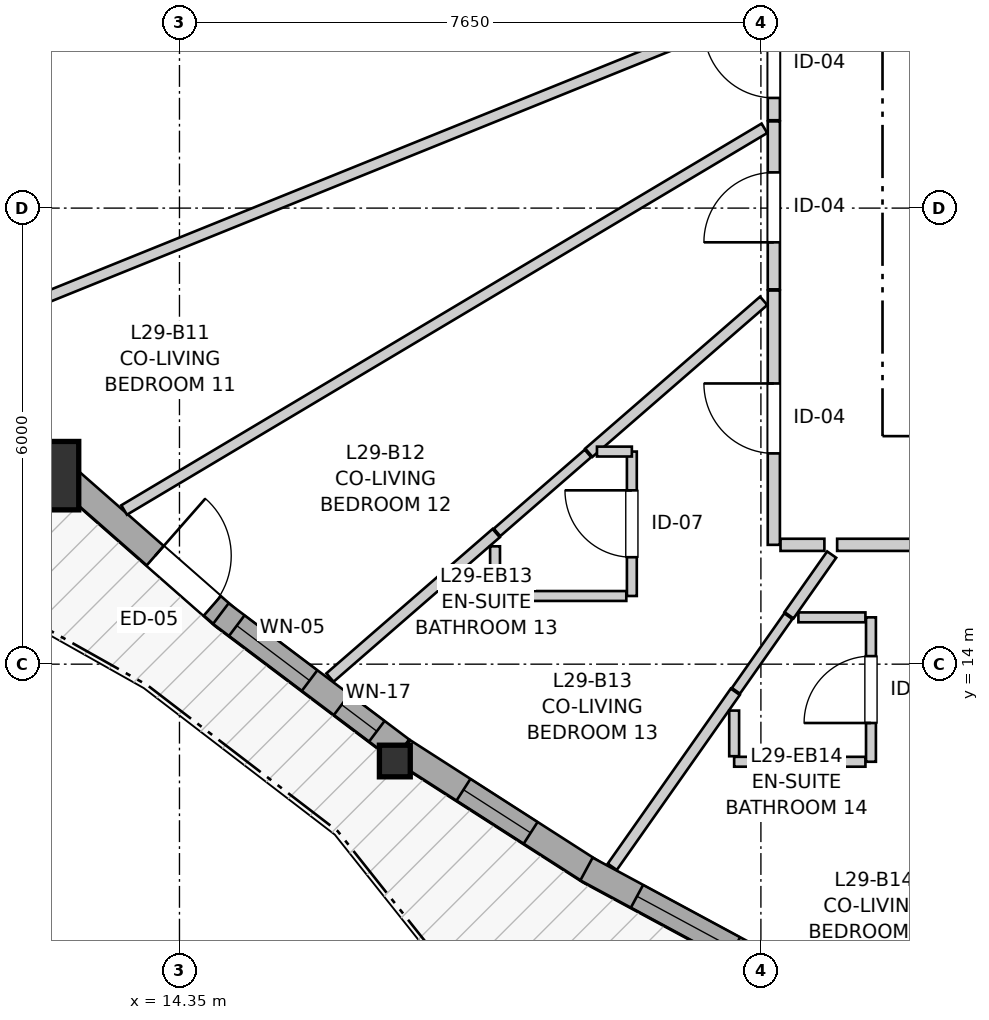
"""IFC4 building model, lengths in metres.
Left out: names, types, materials, properties, quantities, classifications, styles, units other than length and angle.
Written with IfcOpenShell. Run it as: python <this file> out.ifc"""

import sys

from ifc_helpers import new_model, si_unit, direction, frame, frame_2d, origin, origin_2d, place, context, subcontext, project, spatial, rectangle, i_section, extrude, source, transform, mapped, element, fill, save


model = new_model("IFC4")
c1 = context("Model", 3, precision=1e-05, world=origin(), true_north=direction((0.0, 1.0)))
c2 = subcontext(c1, "Body", "Model", "MODEL_VIEW")
j1 = project(units=[si_unit("LENGTHUNIT", "METRE"), si_unit("PLANEANGLEUNIT", "RADIAN")], contexts=[c1])
p1 = place(None, origin())
s1 = spatial("IfcSite", under=j1, at=p1, CompositionType="ELEMENT")
p2 = place(p1, origin())
s2 = spatial("IfcBuilding", under=s1, at=p2, CompositionType="ELEMENT")
p3 = place(p2, frame((0.0, 0.0, 99.2)))
s3 = spatial("IfcBuildingStorey", under=s2, at=p3, CompositionType="ELEMENT", Elevation=99.2)
m1 = source(origin(), c2, "Body", "SweptSolid", [
    extrude(rectangle(XDim=0.9, YDim=0.9, at=origin_2d()), origin(), (0.0, 0.0, 1.0), 2.95),
])
p4 = place(p3, frame((12.575, 16.48, 0.0), z_axis=(0.0, 0.0, 1.0), x_axis=(1.0, 0.0, 0.0)))
e1 = element("IfcColumn", 1, at=p4, inside=s3, PredefinedType="COLUMN", context=c2, shape_type="MappedRepresentation", body=[
    mapped(m1, transform((0.0, 0.0, 0.0), x_axis=(1.0, 0.0, 0.0), y_axis=(0.0, 1.0, 0.0), z_axis=(0.0, 0.0, 1.0), scale=1.0)),
])
m2 = source(origin(), c2, "Body", "SweptSolid", [
    extrude(i_section(OverallWidth=0.406, OverallDepth=0.416, WebThickness=0.027, FlangeThickness=0.044, FilletRadius=0.015, at=origin_2d()), origin(), (0.0, 0.0, 1.0), 2.95),
])
p5 = place(p3, frame((17.184, 12.726, 0.0), z_axis=(0.0, 0.0, 1.0), x_axis=(1.0, 0.0, 0.0)))
e2 = element("IfcColumn", 2, at=p5, inside=s3, PredefinedType="PILASTER", context=c2, shape_type="MappedRepresentation", body=[
    mapped(m2, transform((0.0, 0.0, 0.0), x_axis=(1.0, 0.0, 0.0), y_axis=(0.0, 1.0, 0.0), z_axis=(0.0, 0.0, 1.0), scale=1.0)),
])
p6 = place(p3, frame((12.86, 16.456, 0.0), z_axis=(0.0, 0.0, 1.0), x_axis=(0.751500349331, -0.659732692047, 0.0)))
e3 = element("IfcWall", 3, at=p6, inside=s3, PredefinedType="SOLIDWALL", context=c2, shape_type="SweptSolid", body=[
    extrude(rectangle(XDim=2.799, YDim=0.34, at=frame_2d((1.399, 0.0))), origin(), (0.0, 0.0, 1.0), 2.48),
])
p7 = place(p6, frame((1.559, 0.0, 0.0)))
e4 = element("IfcOpeningElement", 4, at=p7, cuts=e3, PredefinedType="OPENING", context=c2, shape_type="SweptSolid", body=[
    extrude(rectangle(XDim=1.0, YDim=2.1, at=frame_2d((0.5, 1.05))), frame((0.0, 0.18, 0.0), z_axis=(0.0, -1.0, 0.0), x_axis=(1.0, 0.0, 0.0)), (0.0, 0.0, 1.0), 0.36),
])
p8 = place(p3, frame((14.894, 14.665, 0.0), z_axis=(0.0, 0.0, 1.0), x_axis=(0.798431756537, -0.602085318001, 0.0)))
e5 = element("IfcWall", 5, at=p8, inside=s3, PredefinedType="SOLIDWALL", context=c2, shape_type="SweptSolid", body=[
    extrude(rectangle(XDim=2.976, YDim=0.34, at=frame_2d((1.488, 0.0))), origin(), (0.0, 0.0, 1.0), 2.48),
])
p9 = place(p8, frame((0.263, 0.0, 0.82)))
e6 = element("IfcOpeningElement", 6, at=p9, cuts=e5, PredefinedType="OPENING", context=c2, shape_type="SweptSolid", body=[
    extrude(rectangle(XDim=1.2, YDim=1.45, at=frame_2d((0.6, 0.725))), frame((0.0, 0.18, 0.0), z_axis=(0.0, -1.0, 0.0), x_axis=(1.0, 0.0, 0.0)), (0.0, 0.0, 1.0), 0.36),
])
p10 = place(p8, frame((1.991, 0.0, 0.82)))
e7 = element("IfcOpeningElement", 7, at=p10, cuts=e5, PredefinedType="OPENING", context=c2, shape_type="SweptSolid", body=[
    extrude(rectangle(XDim=0.58, YDim=1.35, at=frame_2d((0.29, 0.675))), frame((0.0, 0.18, 0.0), z_axis=(0.0, -1.0, 0.0), x_axis=(1.0, 0.0, 0.0)), (0.0, 0.0, 1.0), 0.36),
])
p11 = place(p3, frame((17.292, 12.858, 0.0), z_axis=(0.0, 0.0, 1.0), x_axis=(0.841524200167, -0.540219418878, 0.0)))
e8 = element("IfcWall", 8, at=p11, inside=s3, PredefinedType="SOLIDWALL", context=c2, shape_type="SweptSolid", body=[
    extrude(rectangle(XDim=2.958, YDim=0.34, at=frame_2d((1.479, 0.0))), origin(), (0.0, 0.0, 1.0), 2.48),
])
p12 = place(p11, frame((0.944, 0.0, 0.82)))
e9 = element("IfcOpeningElement", 9, at=p12, cuts=e8, PredefinedType="OPENING", context=c2, shape_type="SweptSolid", body=[
    extrude(rectangle(XDim=1.05, YDim=1.45, at=frame_2d((0.525, 0.725))), frame((0.0, 0.18, 0.0), z_axis=(0.0, -1.0, 0.0), x_axis=(1.0, 0.0, 0.0)), (0.0, 0.0, 1.0), 0.36),
])
p13 = place(p3, frame((19.705, 11.305, 0.0), z_axis=(0.0, 0.0, 1.0), x_axis=(0.880065774925, -0.474851799834, 0.0)))
e10 = element("IfcWall", 10, at=p13, inside=s3, PredefinedType="SOLIDWALL", context=c2, shape_type="SweptSolid", body=[
    extrude(rectangle(XDim=2.749, YDim=0.34, at=frame_2d((1.374, 0.0))), origin(), (0.0, 0.0, 1.0), 2.48),
])
p14 = place(p13, frame((0.755, 0.0, 0.82)))
e11 = element("IfcOpeningElement", 11, at=p14, cuts=e10, PredefinedType="OPENING", context=c2, shape_type="SweptSolid", body=[
    extrude(rectangle(XDim=1.45, YDim=1.25, at=frame_2d((0.725, 0.625))), frame((0.0, 0.18, 0.0), z_axis=(0.0, -1.0, 0.0), x_axis=(1.0, 0.0, 0.0)), (0.0, 0.0, 1.0), 0.36),
])
p15 = place(p3, frame((26.473, 15.57, 0.0), z_axis=(0.0, 0.0, 1.0), x_axis=(-1.0, 0.0, 0.0)))
e12 = element("IfcWall", 12, at=p15, inside=s3, PredefinedType="PARTITIONING", context=c2, shape_type="SweptSolid", body=[
    extrude(rectangle(XDim=3.47, YDim=0.16, at=frame_2d((1.735, 0.0))), origin(), (0.0, 0.0, 1.0), 2.95),
])
p16 = place(p15, frame((1.274, 0.0, 0.0)))
e13 = element("IfcOpeningElement", 13, at=p16, cuts=e12, PredefinedType="OPENING", context=c2, shape_type="SweptSolid", body=[
    extrude(rectangle(XDim=0.92, YDim=2.1, at=frame_2d((0.46, 1.05))), frame((0.0, 0.09, 0.0), z_axis=(0.0, -1.0, 0.0), x_axis=(1.0, 0.0, 0.0)), (0.0, 0.0, 1.0), 0.18),
])
p17 = place(p3, frame((22.17, 15.57, 0.0), z_axis=(0.0, 0.0, 1.0), x_axis=(0.0, 1.0, 0.0)))
e14 = element("IfcWall", 14, at=p17, inside=s3, PredefinedType="PARTITIONING", context=c2, shape_type="SweptSolid", body=[
    extrude(rectangle(XDim=3.346, YDim=0.16, at=frame_2d((1.673, 0.0))), origin(), (0.0, 0.0, 1.0), 2.95),
])
p18 = place(p17, frame((1.203, 0.0, 0.0)))
e15 = element("IfcOpeningElement", 15, at=p18, cuts=e14, PredefinedType="OPENING", context=c2, shape_type="SweptSolid", body=[
    extrude(rectangle(XDim=0.92, YDim=2.1, at=frame_2d((0.46, 1.05))), frame((0.0, 0.09, 0.0), z_axis=(0.0, -1.0, 0.0), x_axis=(1.0, 0.0, 0.0)), (0.0, 0.0, 1.0), 0.18),
])
p19 = place(p3, frame((22.17, 18.931, 0.0), z_axis=(0.0, 0.0, 1.0), x_axis=(0.0, 1.0, 0.0)))
e16 = element("IfcWall", 16, at=p19, inside=s3, PredefinedType="PARTITIONING", context=c2, shape_type="SweptSolid", body=[
    extrude(rectangle(XDim=2.21, YDim=0.16, at=frame_2d((1.105, 0.0))), origin(), (0.0, 0.0, 1.0), 2.95),
])
p20 = place(p19, frame((0.619, 0.0, 0.0)))
e17 = element("IfcOpeningElement", 17, at=p20, cuts=e16, PredefinedType="OPENING", context=c2, shape_type="SweptSolid", body=[
    extrude(rectangle(XDim=0.92, YDim=2.1, at=frame_2d((0.46, 1.05))), frame((0.0, 0.09, 0.0), z_axis=(0.0, -1.0, 0.0), x_axis=(1.0, 0.0, 0.0)), (0.0, 0.0, 1.0), 0.18),
])
p21 = place(p3, frame((20.302, 14.897, 0.0), z_axis=(0.0, 0.0, 1.0), x_axis=(0.0, 1.0, 0.0)))
e18 = element("IfcWall", 18, at=p21, inside=s3, PredefinedType="PARTITIONING", context=c2, shape_type="SweptSolid", body=[
    extrude(rectangle(XDim=1.9, YDim=0.13, at=frame_2d((0.95, 0.0))), origin(), (0.0, 0.0, 1.0), 2.95),
])
p22 = place(p21, frame((0.51, 0.0, 0.0)))
e19 = element("IfcOpeningElement", 19, at=p22, cuts=e18, PredefinedType="OPENING", context=c2, shape_type="SweptSolid", body=[
    extrude(rectangle(XDim=0.88, YDim=2.05, at=frame_2d((0.44, 1.025))), frame((0.0, 0.075, 0.0), z_axis=(0.0, -1.0, 0.0), x_axis=(1.0, 0.0, 0.0)), (0.0, 0.0, 1.0), 0.15),
])
p23 = place(p3, frame((23.448, 12.716, 0.0), z_axis=(0.0, 0.0, 1.0), x_axis=(0.0, 1.0, 0.0)))
e20 = element("IfcWall", 20, at=p23, inside=s3, PredefinedType="PARTITIONING", context=c2, shape_type="SweptSolid", body=[
    extrude(rectangle(XDim=1.9, YDim=0.13, at=frame_2d((0.95, 0.0))), origin(), (0.0, 0.0, 1.0), 2.95),
])
p24 = place(p23, frame((0.51, 0.0, 0.0)))
e21 = element("IfcOpeningElement", 21, at=p24, cuts=e20, PredefinedType="OPENING", context=c2, shape_type="SweptSolid", body=[
    extrude(rectangle(XDim=0.88, YDim=2.05, at=frame_2d((0.44, 1.025))), frame((0.0, 0.075, 0.0), z_axis=(0.0, -1.0, 0.0), x_axis=(1.0, 0.0, 0.0)), (0.0, 0.0, 1.0), 0.15),
])
p25 = place(p3, frame((22.17, 21.156, 0.0), z_axis=(0.0, 0.0, 1.0), x_axis=(0.0, 1.0, 0.0)))
e22 = element("IfcWall", 22, at=p25, inside=s3, PredefinedType="PARTITIONING", context=c2, shape_type="SweptSolid", body=[
    extrude(rectangle(XDim=1.555, YDim=0.16, at=frame_2d((0.777, 0.0))), origin(), (0.0, 0.0, 1.0), 2.95),
])
p26 = place(p25, frame((0.293, 0.0, 0.0)))
e23 = element("IfcOpeningElement", 23, at=p26, cuts=e22, PredefinedType="OPENING", context=c2, shape_type="SweptSolid", body=[
    extrude(rectangle(XDim=0.92, YDim=2.1, at=frame_2d((0.46, 1.05))), frame((0.0, 0.09, 0.0), z_axis=(0.0, -1.0, 0.0), x_axis=(1.0, 0.0, 0.0)), (0.0, 0.0, 1.0), 0.18),
])
p27 = place(p3, frame((11.28, 18.294, 0.0), z_axis=(0.0, 0.0, 1.0), x_axis=(0.927137862507, 0.374720407645, 0.0)))
e24 = element("IfcWall", 24, at=p27, inside=s3, PredefinedType="PARTITIONING", context=c2, shape_type="SweptSolid", body=[
    extrude(rectangle(XDim=11.622, YDim=0.145, at=frame_2d((5.811, 0.0))), origin(), (0.0, 0.0, 1.0), 2.95),
])
p28 = place(p3, frame((13.622, 16.028, 0.0), z_axis=(0.0, 0.0, 1.0), x_axis=(0.85896108151, 0.512040877716, 0.0)))
e25 = element("IfcWall", 25, at=p28, inside=s3, PredefinedType="PARTITIONING", context=c2, shape_type="SweptSolid", body=[
    extrude(rectangle(XDim=9.807, YDim=0.145, at=frame_2d((4.904, 0.0))), origin(), (0.0, 0.0, 1.0), 2.95),
])
p29 = place(p3, frame((19.736, 16.782, 0.0), z_axis=(0.0, 0.0, 1.0), x_axis=(0.754964216329, 0.655765988796, 0.0)))
e26 = element("IfcWall", 26, at=p29, inside=s3, PredefinedType="PARTITIONING", context=c2, shape_type="SweptSolid", body=[
    extrude(rectangle(XDim=3.047, YDim=0.145, at=frame_2d((1.523, 0.0))), origin(), (0.0, 0.0, 1.0), 2.95),
])
p30 = place(p3, frame((16.33, 13.824, 0.0), z_axis=(0.0, 0.0, 1.0), x_axis=(0.754843145593, 0.655905348013, 0.0)))
e27 = element("IfcWall", 27, at=p30, inside=s3, PredefinedType="PARTITIONING", context=c2, shape_type="SweptSolid", body=[
    extrude(rectangle(XDim=2.897, YDim=0.145, at=frame_2d((1.448, 0.0))), origin(), (0.0, 0.0, 1.0), 2.95),
])
p31 = place(p3, frame((20.044, 11.334, 0.0), z_axis=(0.0, 0.0, 1.0), x_axis=(0.575027113175, 0.818134352728, 0.0)))
e28 = element("IfcWall", 28, at=p31, inside=s3, PredefinedType="PARTITIONING", context=c2, shape_type="SweptSolid", body=[
    extrude(rectangle(XDim=2.815, YDim=0.145, at=frame_2d((1.407, 0.0))), origin(), (0.0, 0.0, 1.0), 2.95),
])
for number, where, z_axis, x_axis in (
    (29, (18.502, 14.897, 0.0), (0.0, 0.0, 1.0), (1.0, 0.0, 0.0)),
    (30, (21.648, 12.716, 0.0), (0.0, 0.0, 1.0), (1.0, 0.0, 0.0)),
):
    element("IfcWall", number, at=place(p3, frame(where, z_axis=z_axis, x_axis=x_axis)), inside=s3, PredefinedType="PARTITIONING", context=c2, shape_type="SweptSolid", body=[
        extrude(rectangle(XDim=1.727, YDim=0.13, at=frame_2d((0.864, 0.0))), origin(), (0.0, 0.0, 1.0), 2.95),
    ])
p32 = place(p3, frame((18.528, 15.734, 0.0), z_axis=(0.0, 0.0, 1.0), x_axis=(0.755063236967, 0.655651971843, 0.0)))
e31 = element("IfcWall", 31, at=p32, inside=s3, PredefinedType="PARTITIONING", context=c2, shape_type="SweptSolid", body=[
    extrude(rectangle(XDim=1.584, YDim=0.13, at=frame_2d((0.792, 0.0))), origin(), (0.0, 0.0, 1.0), 2.95),
])
p33 = place(p3, frame((21.671, 13.649, 0.0), z_axis=(0.0, 0.0, 1.0), x_axis=(0.574868196693, 0.81824602439, 0.0)))
e32 = element("IfcWall", 32, at=p33, inside=s3, PredefinedType="PARTITIONING", context=c2, shape_type="SweptSolid", body=[
    extrude(rectangle(XDim=1.2, YDim=0.13, at=frame_2d((0.6, 0.0))), origin(), (0.0, 0.0, 1.0), 2.95),
])
p34 = place(p3, frame((22.37, 14.643, 0.0), z_axis=(0.0, 0.0, 1.0), x_axis=(0.575022445487, 0.818137633401, 0.0)))
e33 = element("IfcWall", 33, at=p34, inside=s3, PredefinedType="PARTITIONING", context=c2, shape_type="SweptSolid", body=[
    extrude(rectangle(XDim=0.976, YDim=0.145, at=frame_2d((0.488, 0.0))), origin(), (0.0, 0.0, 1.0), 2.95),
])
p35 = place(p3, frame((22.493, 14.616, 0.0), z_axis=(0.0, 0.0, 1.0), x_axis=(1.0, 0.0, 0.0)))
e34 = element("IfcWall", 34, at=p35, inside=s3, PredefinedType="PARTITIONING", context=c2, shape_type="SweptSolid", body=[
    extrude(rectangle(XDim=0.882, YDim=0.13, at=frame_2d((0.441, 0.0))), origin(), (0.0, 0.0, 1.0), 2.95),
])
p36 = place(p3, frame((21.648, 12.789, 0.0), z_axis=(0.0, 0.0, 1.0), x_axis=(0.0, 1.0, 0.0)))
e35 = element("IfcWall", 35, at=p36, inside=s3, PredefinedType="PARTITIONING", context=c2, shape_type="SweptSolid", body=[
    extrude(rectangle(XDim=0.6, YDim=0.13, at=frame_2d((0.3, 0.0))), origin(), (0.0, 0.0, 1.0), 2.95),
])
p37 = place(p3, frame((22.258, 15.57, 0.0), z_axis=(0.0, 0.0, 1.0), x_axis=(1.0, 0.0, 0.0)))
e36 = element("IfcWall", 36, at=p37, inside=s3, PredefinedType="PARTITIONING", context=c2, shape_type="SweptSolid", body=[
    extrude(rectangle(XDim=0.577, YDim=0.16, at=frame_2d((0.289, 0.0))), origin(), (0.0, 0.0, 1.0), 2.95),
])
p38 = place(p3, frame((18.502, 14.97, 0.0), z_axis=(0.0, 0.0, 1.0), x_axis=(0.0, 1.0, 0.0)))
e37 = element("IfcWall", 37, at=p38, inside=s3, PredefinedType="PARTITIONING", context=c2, shape_type="SweptSolid", body=[
    extrude(rectangle(XDim=0.581, YDim=0.13, at=frame_2d((0.29, 0.0))), origin(), (0.0, 0.0, 1.0), 2.95),
])
p39 = place(p3, frame((19.843, 16.797, 0.0), z_axis=(0.0, 0.0, 1.0), x_axis=(1.0, 0.0, 0.0)))
e38 = element("IfcWall", 38, at=p39, inside=s3, PredefinedType="PARTITIONING", context=c2, shape_type="SweptSolid", body=[
    extrude(rectangle(XDim=0.459, YDim=0.13, at=frame_2d((0.229, 0.0))), origin(), (0.0, 0.0, 1.0), 2.95),
])
m3 = source(origin(), c2, "Body", "SweptSolid", [
    extrude(rectangle(XDim=1.2, YDim=1.45, at=frame_2d((0.6, 0.725))), frame((0.0, 0.03, 0.0), z_axis=(0.0, -1.0, 0.0), x_axis=(1.0, 0.0, 0.0)), (0.0, 0.0, 1.0), 0.06),
])
p40 = place(p9, origin())
e39 = element("IfcWindow", 39, at=p40, inside=s3, PartitioningType="SINGLE_PANEL", PredefinedType="WINDOW", context=c2, shape_type="MappedRepresentation", body=[
    mapped(m3, transform((0.0, 0.0, 0.0), x_axis=(1.0, 0.0, 0.0), y_axis=(0.0, 1.0, 0.0), z_axis=(0.0, 0.0, 1.0), scale=1.0)),
])
fill(e6, e39)
m4 = source(origin(), c2, "Body", "SweptSolid", [
    extrude(rectangle(XDim=0.58, YDim=1.35, at=frame_2d((0.29, 0.675))), frame((0.0, 0.03, 0.0), z_axis=(0.0, -1.0, 0.0), x_axis=(1.0, 0.0, 0.0)), (0.0, 0.0, 1.0), 0.06),
])
p41 = place(p10, origin())
e40 = element("IfcWindow", 40, at=p41, inside=s3, PartitioningType="SINGLE_PANEL", PredefinedType="WINDOW", context=c2, shape_type="MappedRepresentation", body=[
    mapped(m4, transform((0.0, 0.0, 0.0), x_axis=(1.0, 0.0, 0.0), y_axis=(0.0, 1.0, 0.0), z_axis=(0.0, 0.0, 1.0), scale=1.0)),
])
fill(e7, e40)
m5 = source(origin(), c2, "Body", "SweptSolid", [
    extrude(rectangle(XDim=1.05, YDim=1.45, at=frame_2d((0.525, 0.725))), frame((0.0, 0.03, 0.0), z_axis=(0.0, -1.0, 0.0), x_axis=(1.0, 0.0, 0.0)), (0.0, 0.0, 1.0), 0.06),
])
p42 = place(p12, origin())
e41 = element("IfcWindow", 41, at=p42, inside=s3, PartitioningType="SINGLE_PANEL", PredefinedType="WINDOW", context=c2, shape_type="MappedRepresentation", body=[
    mapped(m5, transform((0.0, 0.0, 0.0), x_axis=(1.0, 0.0, 0.0), y_axis=(0.0, 1.0, 0.0), z_axis=(0.0, 0.0, 1.0), scale=1.0)),
])
fill(e9, e41)
m6 = source(origin(), c2, "Body", "SweptSolid", [
    extrude(rectangle(XDim=1.45, YDim=1.25, at=frame_2d((0.725, 0.625))), frame((0.0, 0.03, 0.0), z_axis=(0.0, -1.0, 0.0), x_axis=(1.0, 0.0, 0.0)), (0.0, 0.0, 1.0), 0.06),
])
p43 = place(p14, origin())
e42 = element("IfcWindow", 42, at=p43, inside=s3, PartitioningType="SINGLE_PANEL", PredefinedType="WINDOW", context=c2, shape_type="MappedRepresentation", body=[
    mapped(m6, transform((0.0, 0.0, 0.0), x_axis=(1.0, 0.0, 0.0), y_axis=(0.0, 1.0, 0.0), z_axis=(0.0, 0.0, 1.0), scale=1.0)),
])
fill(e11, e42)
m7 = source(origin(), c2, "Body", "SweptSolid", [
    extrude(rectangle(XDim=1.0, YDim=2.1, at=frame_2d((0.5, 1.05))), frame((0.0, 0.025, 0.0), z_axis=(0.0, -1.0, 0.0), x_axis=(1.0, 0.0, 0.0)), (0.0, 0.0, 1.0), 0.05),
])
p44 = place(p7, origin())
e43 = element("IfcDoor", 43, at=p44, inside=s3, OperationType="SINGLE_SWING_LEFT", PredefinedType="DOOR", context=c2, shape_type="MappedRepresentation", body=[
    mapped(m7, transform((0.0, 0.0, 0.0), x_axis=(1.0, 0.0, 0.0), y_axis=(0.0, 1.0, 0.0), z_axis=(0.0, 0.0, 1.0), scale=1.0)),
])
fill(e4, e43)
m8 = source(origin(), c2, "Body", "SweptSolid", [
    extrude(rectangle(XDim=0.92, YDim=2.1, at=frame_2d((0.46, 1.05))), frame((0.0, 0.025, 0.0), z_axis=(0.0, -1.0, 0.0), x_axis=(1.0, 0.0, 0.0)), (0.0, 0.0, 1.0), 0.05),
])
p45 = place(p18, origin())
e44 = element("IfcDoor", 44, at=p45, inside=s3, OperationType="SINGLE_SWING_RIGHT", PredefinedType="DOOR", context=c2, shape_type="MappedRepresentation", body=[
    mapped(m8, transform((0.0, 0.0, 0.0), x_axis=(1.0, 0.0, 0.0), y_axis=(0.0, 1.0, 0.0), z_axis=(0.0, 0.0, 1.0), scale=1.0)),
])
fill(e15, e44)
p46 = place(p20, origin())
e45 = element("IfcDoor", 45, at=p46, inside=s3, OperationType="SINGLE_SWING_LEFT", PredefinedType="DOOR", context=c2, shape_type="MappedRepresentation", body=[
    mapped(m8, transform((0.0, 0.0, 0.0), x_axis=(1.0, 0.0, 0.0), y_axis=(0.0, 1.0, 0.0), z_axis=(0.0, 0.0, 1.0), scale=1.0)),
])
fill(e17, e45)
m9 = source(origin(), c2, "Body", "SweptSolid", [
    extrude(rectangle(XDim=0.88, YDim=2.05, at=frame_2d((0.44, 1.025))), frame((0.0, 0.025, 0.0), z_axis=(0.0, -1.0, 0.0), x_axis=(1.0, 0.0, 0.0)), (0.0, 0.0, 1.0), 0.05),
])
p47 = place(p22, origin())
e46 = element("IfcDoor", 46, at=p47, inside=s3, OperationType="SINGLE_SWING_RIGHT", PredefinedType="DOOR", context=c2, shape_type="MappedRepresentation", body=[
    mapped(m9, transform((0.0, 0.0, 0.0), x_axis=(1.0, 0.0, 0.0), y_axis=(0.0, 1.0, 0.0), z_axis=(0.0, 0.0, 1.0), scale=1.0)),
])
fill(e19, e46)
p48 = place(p24, origin())
e47 = element("IfcDoor", 47, at=p48, inside=s3, OperationType="SINGLE_SWING_LEFT", PredefinedType="DOOR", context=c2, shape_type="MappedRepresentation", body=[
    mapped(m9, transform((0.0, 0.0, 0.0), x_axis=(1.0, 0.0, 0.0), y_axis=(0.0, 1.0, 0.0), z_axis=(0.0, 0.0, 1.0), scale=1.0)),
])
fill(e21, e47)
p49 = place(p26, origin())
e48 = element("IfcDoor", 48, at=p49, inside=s3, OperationType="SINGLE_SWING_RIGHT", PredefinedType="DOOR", context=c2, shape_type="MappedRepresentation", body=[
    mapped(m8, transform((0.0, 0.0, 0.0), x_axis=(1.0, 0.0, 0.0), y_axis=(0.0, 1.0, 0.0), z_axis=(0.0, 0.0, 1.0), scale=1.0)),
])
fill(e23, e48)
save(model, sys.argv[1])
